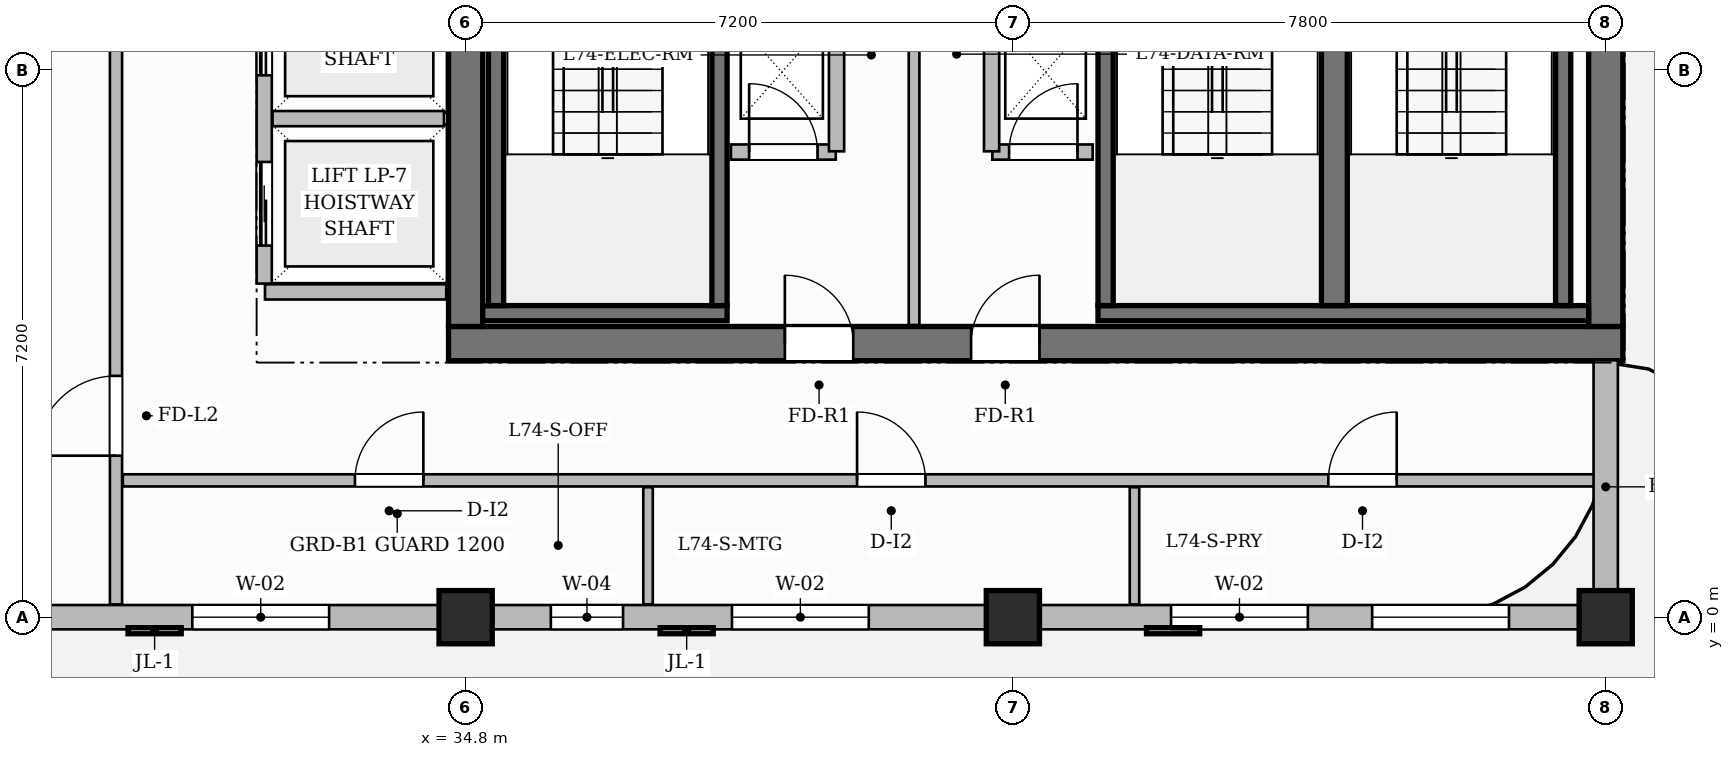
"""IFC4 building model, lengths in metres.
Left out: names, types, materials, properties, quantities, classifications, styles, units other than length and angle.
Written with IfcOpenShell. Run it as: python <this file> out.ifc"""

import sys

from ifc_helpers import new_model, si_unit, direction, frame, frame_2d, origin, origin_2d, place, context, subcontext, project, spatial, rectangle, extrude, source, transform, mapped, element, fill, save


model = new_model("IFC4")
c1 = context("Model", 3, precision=1e-05, world=origin(), true_north=direction((0.0, 1.0)))
c2 = subcontext(c1, "Body", "Model", "MODEL_VIEW")
j1 = project(units=[si_unit("LENGTHUNIT", "METRE"), si_unit("PLANEANGLEUNIT", "RADIAN")], contexts=[c1])
p1 = place(None, origin())
s1 = spatial("IfcSite", under=j1, at=p1, CompositionType="ELEMENT")
p2 = place(p1, origin())
s2 = spatial("IfcBuilding", under=s1, at=p2, CompositionType="ELEMENT")
p3 = place(p2, frame((0.0, 0.0, 294.3)))
s3 = spatial("IfcBuildingStorey", under=s2, at=p3, CompositionType="ELEMENT", Elevation=294.3)
p4 = place(p3, frame((34.575, 3.6, 0.0), z_axis=(0.0, 0.0, 1.0), x_axis=(1.0, 0.0, 0.0)))
e1 = element("IfcWall", 1, at=p4, inside=s3, PredefinedType="SHEAR", context=c2, shape_type="SweptSolid", body=[
    extrude(rectangle(XDim=15.45, YDim=0.45, at=frame_2d((7.725, 0.0))), origin(), (0.0, 0.0, 1.0), 4.8),
])
p5 = place(p4, frame((4.425, 0.0, 0.0)))
e2 = element("IfcOpeningElement", 2, at=p5, cuts=e1, PredefinedType="OPENING", context=c2, shape_type="SweptSolid", body=[
    extrude(rectangle(XDim=0.9, YDim=2.1, at=frame_2d((0.45, 1.05))), frame((0.0, 0.235, 0.0), z_axis=(0.0, -1.0, 0.0), x_axis=(1.0, 0.0, 0.0)), (0.0, 0.0, 1.0), 0.47),
])
p6 = place(p4, frame((6.875, 0.0, 0.0)))
e3 = element("IfcOpeningElement", 3, at=p6, cuts=e1, PredefinedType="OPENING", context=c2, shape_type="SweptSolid", body=[
    extrude(rectangle(XDim=0.9, YDim=2.1, at=frame_2d((0.45, 1.05))), frame((0.0, 0.235, 0.0), z_axis=(0.0, -1.0, 0.0), x_axis=(1.0, 0.0, 0.0)), (0.0, 0.0, 1.0), 0.47),
])
for number, where, z_axis, x_axis in (
    (4, (34.8, 3.825, 0.0), (0.0, 0.0, 1.0), (0.0, 1.0, 0.0)),
    (5, (49.8, 3.825, 0.0), (0.0, 0.0, 1.0), (0.0, 1.0, 0.0)),
):
    element("IfcWall", number, at=place(p3, frame(where, z_axis=z_axis, x_axis=x_axis)), inside=s3, PredefinedType="SHEAR", context=c2, shape_type="SweptSolid", body=[
        extrude(rectangle(XDim=10.35, YDim=0.45, at=frame_2d((5.175, 0.0))), origin(), (0.0, 0.0, 1.0), 4.8),
    ])
m1 = source(origin(), c2, "Body", "SweptSolid", [
    extrude(rectangle(XDim=0.7, YDim=0.7, at=origin_2d()), origin(), (0.0, 0.0, 1.0), 4.8),
])
for number, where, z_axis, x_axis in (
    (6, (34.8, 0.0, 0.0), (0.0, 0.0, 1.0), (1.0, 0.0, 0.0)),
    (7, (42.0, 0.0, 0.0), (0.0, 0.0, 1.0), (1.0, 0.0, 0.0)),
    (8, (49.8, 0.0, 0.0), (0.0, 0.0, 1.0), (1.0, 0.0, 0.0)),
):
    element("IfcColumn", number, at=place(p3, frame(where, z_axis=z_axis, x_axis=x_axis)), inside=s3, PredefinedType="COLUMN", context=c2, shape_type="MappedRepresentation", body=[
        mapped(m1, transform((0.0, 0.0, 0.0), scale=1.0)),
    ])
p7 = place(p3, frame((35.025, 4.0, 0.0), z_axis=(0.0, 0.0, 1.0), x_axis=(1.0, 0.0, 0.0)))
e9 = element("IfcWall", 9, at=p7, inside=s3, PredefinedType="SHEAR", context=c2, shape_type="SweptSolid", body=[
    extrude(rectangle(XDim=3.215, YDim=0.2, at=frame_2d((1.607, 0.0))), origin(), (0.0, 0.0, 1.0), 4.8),
])
for number, where, z_axis, x_axis in (
    (10, (35.2, 4.1, 0.0), (0.0, 0.0, 1.0), (0.0, 1.0, 0.0)),
    (11, (38.14, 4.1, 0.0), (0.0, 0.0, 1.0), (0.0, 1.0, 0.0)),
):
    element("IfcWall", number, at=place(p3, frame(where, z_axis=z_axis, x_axis=x_axis)), inside=s3, PredefinedType="SHEAR", context=c2, shape_type="SweptSolid", body=[
        extrude(rectangle(XDim=6.95, YDim=0.2, at=frame_2d((3.475, 0.0))), origin(), (0.0, 0.0, 1.0), 4.8),
    ])
p8 = place(p3, frame((43.12, 4.0, 0.0), z_axis=(0.0, 0.0, 1.0), x_axis=(1.0, 0.0, 0.0)))
e12 = element("IfcWall", 12, at=p8, inside=s3, PredefinedType="SHEAR", context=c2, shape_type="SweptSolid", body=[
    extrude(rectangle(XDim=6.455, YDim=0.2, at=frame_2d((3.228, 0.0))), origin(), (0.0, 0.0, 1.0), 4.8),
])
p9 = place(p3, frame((43.22, 4.1, 0.0), z_axis=(0.0, 0.0, 1.0), x_axis=(0.0, 1.0, 0.0)))
e13 = element("IfcWall", 13, at=p9, inside=s3, PredefinedType="SHEAR", context=c2, shape_type="SweptSolid", body=[
    extrude(rectangle(XDim=6.95, YDim=0.2, at=frame_2d((3.475, 0.0))), origin(), (0.0, 0.0, 1.0), 4.8),
])
p10 = place(p3, frame((46.23, 4.1, 0.0), z_axis=(0.0, 0.0, 1.0), x_axis=(0.0, 1.0, 0.0)))
e14 = element("IfcWall", 14, at=p10, inside=s3, PredefinedType="SHEAR", context=c2, shape_type="SweptSolid", body=[
    extrude(rectangle(XDim=6.95, YDim=0.34, at=frame_2d((3.475, 0.0))), origin(), (0.0, 0.0, 1.0), 4.8),
])
p11 = place(p3, frame((49.24, 4.1, 0.0), z_axis=(0.0, 0.0, 1.0), x_axis=(0.0, 1.0, 0.0)))
e15 = element("IfcWall", 15, at=p11, inside=s3, PredefinedType="SHEAR", context=c2, shape_type="SweptSolid", body=[
    extrude(rectangle(XDim=6.95, YDim=0.2, at=frame_2d((3.475, 0.0))), origin(), (0.0, 0.0, 1.0), 4.8),
])
p12 = place(p3, frame((38.29, 6.12, 0.0), z_axis=(0.0, 0.0, 1.0), x_axis=(1.0, 0.0, 0.0)))
e16 = element("IfcWall", 16, at=p12, inside=s3, PredefinedType="PARTITIONING", context=c2, shape_type="SweptSolid", body=[
    extrude(rectangle(XDim=1.38, YDim=0.2, at=frame_2d((0.69, 0.0))), origin(), (0.0, 0.0, 1.0), 4.5),
])
p13 = place(p12, frame((0.24, 0.0, 0.0)))
e17 = element("IfcOpeningElement", 17, at=p13, cuts=e16, PredefinedType="OPENING", context=c2, shape_type="SweptSolid", body=[
    extrude(rectangle(XDim=0.9, YDim=2.1, at=frame_2d((0.45, 1.05))), frame((0.0, 0.11, 0.0), z_axis=(0.0, -1.0, 0.0), x_axis=(1.0, 0.0, 0.0)), (0.0, 0.0, 1.0), 0.22),
])
p14 = place(p3, frame((39.68, 6.13, 0.0), z_axis=(0.0, 0.0, 1.0), x_axis=(0.0, 1.0, 0.0)))
e18 = element("IfcWall", 18, at=p14, inside=s3, PredefinedType="PARTITIONING", context=c2, shape_type="SweptSolid", body=[
    extrude(rectangle(XDim=1.79, YDim=0.2, at=frame_2d((0.895, 0.0))), origin(), (0.0, 0.0, 1.0), 4.5),
])
p15 = place(p3, frame((41.73, 6.12, 0.0), z_axis=(0.0, 0.0, 1.0), x_axis=(1.0, 0.0, 0.0)))
e19 = element("IfcWall", 19, at=p15, inside=s3, PredefinedType="PARTITIONING", context=c2, shape_type="SweptSolid", body=[
    extrude(rectangle(XDim=1.32, YDim=0.2, at=frame_2d((0.66, 0.0))), origin(), (0.0, 0.0, 1.0), 4.5),
])
p16 = place(p15, frame((0.22, 0.0, 0.0)))
e20 = element("IfcOpeningElement", 20, at=p16, cuts=e19, PredefinedType="OPENING", context=c2, shape_type="SweptSolid", body=[
    extrude(rectangle(XDim=0.9, YDim=2.1, at=frame_2d((0.45, 1.05))), frame((0.0, 0.11, 0.0), z_axis=(0.0, -1.0, 0.0), x_axis=(1.0, 0.0, 0.0)), (0.0, 0.0, 1.0), 0.22),
])
p17 = place(p3, frame((41.72, 6.13, 0.0), z_axis=(0.0, 0.0, 1.0), x_axis=(0.0, 1.0, 0.0)))
e21 = element("IfcWall", 21, at=p17, inside=s3, PredefinedType="PARTITIONING", context=c2, shape_type="SweptSolid", body=[
    extrude(rectangle(XDim=1.79, YDim=0.2, at=frame_2d((0.895, 0.0))), origin(), (0.0, 0.0, 1.0), 4.5),
])
p18 = place(p3, frame((40.7, 3.845, 0.0), z_axis=(0.0, 0.0, 1.0), x_axis=(0.0, 1.0, 0.0)))
e22 = element("IfcWall", 22, at=p18, inside=s3, PredefinedType="PARTITIONING", context=c2, shape_type="SweptSolid", body=[
    extrude(rectangle(XDim=4.065, YDim=0.14, at=frame_2d((2.032, 0.0))), origin(), (0.0, 0.0, 1.0), 4.5),
])
p19 = place(p3, frame((32.16, 4.28, 0.0), z_axis=(0.0, 0.0, 1.0), x_axis=(1.0, 0.0, 0.0)))
e23 = element("IfcWall", 23, at=p19, inside=s3, PredefinedType="PARTITIONING", context=c2, shape_type="SweptSolid", body=[
    extrude(rectangle(XDim=2.385, YDim=0.2, at=frame_2d((1.192, 0.0))), origin(), (0.0, 0.0, 1.0), 4.5),
])
p20 = place(p3, frame((32.15, 4.39, 0.0), z_axis=(0.0, 0.0, 1.0), x_axis=(0.0, 1.0, 0.0)))
e24 = element("IfcWall", 24, at=p20, inside=s3, PredefinedType="PARTITIONING", context=c2, shape_type="SweptSolid", body=[
    extrude(rectangle(XDim=8.82, YDim=0.2, at=frame_2d((4.41, 0.0))), origin(), (0.0, 0.0, 1.0), 4.5),
])
p21 = place(p20, frame((0.5, 0.0, 0.0)))
e25 = element("IfcOpeningElement", 25, at=p21, cuts=e24, PredefinedType="OPENING", context=c2, shape_type="SweptSolid", body=[
    extrude(rectangle(XDim=1.1, YDim=2.2, at=frame_2d((0.55, 1.1))), frame((0.0, 0.11, 0.0), z_axis=(0.0, -1.0, 0.0), x_axis=(1.0, 0.0, 0.0)), (0.0, 0.0, 1.0), 0.22),
])
p22 = place(p20, frame((2.74, 0.0, 0.0)))
e26 = element("IfcOpeningElement", 26, at=p22, cuts=e24, PredefinedType="OPENING", context=c2, shape_type="SweptSolid", body=[
    extrude(rectangle(XDim=1.1, YDim=2.2, at=frame_2d((0.55, 1.1))), frame((0.0, 0.11, 0.0), z_axis=(0.0, -1.0, 0.0), x_axis=(1.0, 0.0, 0.0)), (0.0, 0.0, 1.0), 0.22),
])
p23 = place(p20, frame((4.98, 0.0, 0.0)))
e27 = element("IfcOpeningElement", 27, at=p23, cuts=e24, PredefinedType="OPENING", context=c2, shape_type="SweptSolid", body=[
    extrude(rectangle(XDim=1.1, YDim=2.2, at=frame_2d((0.55, 1.1))), frame((0.0, 0.11, 0.0), z_axis=(0.0, -1.0, 0.0), x_axis=(1.0, 0.0, 0.0)), (0.0, 0.0, 1.0), 0.22),
])
p24 = place(p20, frame((7.22, 0.0, 0.0)))
e28 = element("IfcOpeningElement", 28, at=p24, cuts=e24, PredefinedType="OPENING", context=c2, shape_type="SweptSolid", body=[
    extrude(rectangle(XDim=1.1, YDim=2.2, at=frame_2d((0.55, 1.1))), frame((0.0, 0.11, 0.0), z_axis=(0.0, -1.0, 0.0), x_axis=(1.0, 0.0, 0.0)), (0.0, 0.0, 1.0), 0.22),
])
p25 = place(p3, frame((32.26, 6.56, 0.0), z_axis=(0.0, 0.0, 1.0), x_axis=(1.0, 0.0, 0.0)))
e29 = element("IfcWall", 29, at=p25, inside=s3, PredefinedType="PARTITIONING", context=c2, shape_type="SweptSolid", body=[
    extrude(rectangle(XDim=2.255, YDim=0.2, at=frame_2d((1.127, 0.0))), origin(), (0.0, 0.0, 1.0), 4.5),
])
p26 = place(p3, frame((30.2, 0.168, 0.0), z_axis=(0.0, 0.0, 1.0), x_axis=(0.0, 1.0, 0.0)))
e30 = element("IfcWall", 30, at=p26, inside=s3, PredefinedType="PARTITIONING", context=c2, shape_type="SweptSolid", body=[
    extrude(rectangle(XDim=9.492, YDim=0.16, at=frame_2d((4.746, 0.0))), origin(), (0.0, 0.0, 1.0), 4.5),
])
p27 = place(p26, frame((1.957, 0.0, 0.0)))
e31 = element("IfcOpeningElement", 31, at=p27, cuts=e30, PredefinedType="OPENING", context=c2, shape_type="SweptSolid", body=[
    extrude(rectangle(XDim=1.05, YDim=2.15, at=frame_2d((0.525, 1.075))), frame((0.0, 0.09, 0.0), z_axis=(0.0, -1.0, 0.0), x_axis=(1.0, 0.0, 0.0)), (0.0, 0.0, 1.0), 0.18),
])
p28 = place(p3, frame((30.29, 1.8, 0.0), z_axis=(0.0, 0.0, 1.0), x_axis=(1.0, 0.0, 0.0)))
e32 = element("IfcWall", 32, at=p28, inside=s3, PredefinedType="PARTITIONING", context=c2, shape_type="SweptSolid", body=[
    extrude(rectangle(XDim=19.37, YDim=0.16, at=frame_2d((9.685, 0.0))), origin(), (0.0, 0.0, 1.0), 4.5),
])
p29 = place(p28, frame((3.054, 0.0, 0.0)))
e33 = element("IfcOpeningElement", 33, at=p29, cuts=e32, PredefinedType="OPENING", context=c2, shape_type="SweptSolid", body=[
    extrude(rectangle(XDim=0.9, YDim=2.15, at=frame_2d((0.45, 1.075))), frame((0.0, 0.09, 0.0), z_axis=(0.0, -1.0, 0.0), x_axis=(1.0, 0.0, 0.0)), (0.0, 0.0, 1.0), 0.18),
])
p30 = place(p28, frame((9.66, 0.0, 0.0)))
e34 = element("IfcOpeningElement", 34, at=p30, cuts=e32, PredefinedType="OPENING", context=c2, shape_type="SweptSolid", body=[
    extrude(rectangle(XDim=0.9, YDim=2.15, at=frame_2d((0.45, 1.075))), frame((0.0, 0.09, 0.0), z_axis=(0.0, -1.0, 0.0), x_axis=(1.0, 0.0, 0.0)), (0.0, 0.0, 1.0), 0.18),
])
p31 = place(p28, frame((15.86, 0.0, 0.0)))
e35 = element("IfcOpeningElement", 35, at=p31, cuts=e32, PredefinedType="OPENING", context=c2, shape_type="SweptSolid", body=[
    extrude(rectangle(XDim=0.9, YDim=2.15, at=frame_2d((0.45, 1.075))), frame((0.0, 0.09, 0.0), z_axis=(0.0, -1.0, 0.0), x_axis=(1.0, 0.0, 0.0)), (0.0, 0.0, 1.0), 0.18),
])
for number, where, z_axis, x_axis in (
    (36, (37.2, 0.168, 0.0), (0.0, 0.0, 1.0), (0.0, 1.0, 0.0)),
    (37, (43.6, 0.168, 0.0), (0.0, 0.0, 1.0), (0.0, 1.0, 0.0)),
):
    element("IfcWall", number, at=place(p3, frame(where, z_axis=z_axis, x_axis=x_axis)), inside=s3, PredefinedType="PARTITIONING", context=c2, shape_type="SweptSolid", body=[
        extrude(rectangle(XDim=1.542, YDim=0.125, at=frame_2d((0.771, 0.0))), origin(), (0.0, 0.0, 1.0), 4.5),
    ])
p32 = place(p3, frame((18.0, 0.0, 0.0), z_axis=(0.0, 0.0, 1.0), x_axis=(1.0, 0.0, 0.0)))
e38 = element("IfcWall", 38, at=p32, inside=s3, PredefinedType="SOLIDWALL", context=c2, shape_type="SweptSolid", body=[
    extrude(rectangle(XDim=31.8, YDim=0.32, at=frame_2d((15.9, 0.0))), origin(), (0.0, 0.0, 1.0), 3.785),
])
p33 = place(p32, frame((0.42, 0.0, 0.0)))
e39 = element("IfcOpeningElement", 39, at=p33, cuts=e38, PredefinedType="OPENING", context=c2, shape_type="SweptSolid", body=[
    extrude(rectangle(XDim=1.2, YDim=2.2, at=frame_2d((0.6, 1.1))), frame((0.0, 0.17, 0.0), z_axis=(0.0, -1.0, 0.0), x_axis=(1.0, 0.0, 0.0)), (0.0, 0.0, 1.0), 0.34),
])
p34 = place(p32, frame((4.649, 0.0, 0.8)))
e40 = element("IfcOpeningElement", 40, at=p34, cuts=e38, PredefinedType="OPENING", context=c2, shape_type="SweptSolid", body=[
    extrude(rectangle(XDim=0.95, YDim=1.75, at=frame_2d((0.475, 0.875))), frame((0.0, 0.17, 0.0), z_axis=(0.0, -1.0, 0.0), x_axis=(1.0, 0.0, 0.0)), (0.0, 0.0, 1.0), 0.34),
])
p35 = place(p32, frame((7.032, 0.0, 0.8)))
e41 = element("IfcOpeningElement", 41, at=p35, cuts=e38, PredefinedType="OPENING", context=c2, shape_type="SweptSolid", body=[
    extrude(rectangle(XDim=1.8, YDim=1.85, at=frame_2d((0.9, 0.925))), frame((0.0, 0.17, 0.0), z_axis=(0.0, -1.0, 0.0), x_axis=(1.0, 0.0, 0.0)), (0.0, 0.0, 1.0), 0.34),
])
p36 = place(p32, frame((13.204, 0.0, 0.8)))
e42 = element("IfcOpeningElement", 42, at=p36, cuts=e38, PredefinedType="OPENING", context=c2, shape_type="SweptSolid", body=[
    extrude(rectangle(XDim=1.8, YDim=1.85, at=frame_2d((0.9, 0.925))), frame((0.0, 0.17, 0.0), z_axis=(0.0, -1.0, 0.0), x_axis=(1.0, 0.0, 0.0)), (0.0, 0.0, 1.0), 0.34),
])
p37 = place(p32, frame((17.921, 0.0, 0.8)))
e43 = element("IfcOpeningElement", 43, at=p37, cuts=e38, PredefinedType="OPENING", context=c2, shape_type="SweptSolid", body=[
    extrude(rectangle(XDim=0.95, YDim=1.75, at=frame_2d((0.475, 0.875))), frame((0.0, 0.17, 0.0), z_axis=(0.0, -1.0, 0.0), x_axis=(1.0, 0.0, 0.0)), (0.0, 0.0, 1.0), 0.34),
])
p38 = place(p32, frame((20.304, 0.0, 0.8)))
e44 = element("IfcOpeningElement", 44, at=p38, cuts=e38, PredefinedType="OPENING", context=c2, shape_type="SweptSolid", body=[
    extrude(rectangle(XDim=1.8, YDim=1.85, at=frame_2d((0.9, 0.925))), frame((0.0, 0.17, 0.0), z_axis=(0.0, -1.0, 0.0), x_axis=(1.0, 0.0, 0.0)), (0.0, 0.0, 1.0), 0.34),
])
p39 = place(p32, frame((26.081, 0.0, 0.8)))
e45 = element("IfcOpeningElement", 45, at=p39, cuts=e38, PredefinedType="OPENING", context=c2, shape_type="SweptSolid", body=[
    extrude(rectangle(XDim=1.8, YDim=1.85, at=frame_2d((0.9, 0.925))), frame((0.0, 0.17, 0.0), z_axis=(0.0, -1.0, 0.0), x_axis=(1.0, 0.0, 0.0)), (0.0, 0.0, 1.0), 0.34),
])
p40 = place(p32, frame((28.727, 0.0, 0.8)))
e46 = element("IfcOpeningElement", 46, at=p40, cuts=e38, PredefinedType="OPENING", context=c2, shape_type="SweptSolid", body=[
    extrude(rectangle(XDim=1.8, YDim=1.85, at=frame_2d((0.9, 0.925))), frame((0.0, 0.17, 0.0), z_axis=(0.0, -1.0, 0.0), x_axis=(1.0, 0.0, 0.0)), (0.0, 0.0, 1.0), 0.34),
])
p41 = place(p3, frame((49.8, 0.05, 0.0), z_axis=(0.0, 0.0, 1.0), x_axis=(0.0, 1.0, 0.0)))
e47 = element("IfcWall", 47, at=p41, inside=s3, PredefinedType="SOLIDWALL", context=c2, shape_type="SweptSolid", body=[
    extrude(rectangle(XDim=3.33, YDim=0.32, at=frame_2d((1.665, 0.0))), origin(), (0.0, 0.0, 1.0), 4.5),
])
m2 = source(origin(), c2, "Body", "SweptSolid", [
    extrude(rectangle(XDim=0.9, YDim=2.1, at=frame_2d((0.45, 1.05))), frame((0.0, 0.025, 0.0), z_axis=(0.0, -1.0, 0.0), x_axis=(1.0, 0.0, 0.0)), (0.0, 0.0, 1.0), 0.05),
])
p42 = place(p13, origin())
e48 = element("IfcDoor", 48, at=p42, inside=s3, OperationType="SINGLE_SWING_LEFT", PredefinedType="DOOR", context=c2, shape_type="MappedRepresentation", body=[
    mapped(m2, transform((0.0, 0.0, 0.0), scale=1.0)),
])
fill(e17, e48)
p43 = place(p16, origin())
e49 = element("IfcDoor", 49, at=p43, inside=s3, OperationType="SINGLE_SWING_RIGHT", PredefinedType="DOOR", context=c2, shape_type="MappedRepresentation", body=[
    mapped(m2, transform((0.0, 0.0, 0.0), scale=1.0)),
])
fill(e20, e49)
p44 = place(p5, origin())
e50 = element("IfcDoor", 50, at=p44, inside=s3, OperationType="SINGLE_SWING_LEFT", PredefinedType="DOOR", context=c2, shape_type="MappedRepresentation", body=[
    mapped(m2, transform((0.0, 0.0, 0.0), scale=1.0)),
])
fill(e2, e50)
p45 = place(p6, origin())
e51 = element("IfcDoor", 51, at=p45, inside=s3, OperationType="SINGLE_SWING_RIGHT", PredefinedType="DOOR", context=c2, shape_type="MappedRepresentation", body=[
    mapped(m2, transform((0.0, 0.0, 0.0), scale=1.0)),
])
fill(e3, e51)
m3 = source(origin(), c2, "Body", "SweptSolid", [
    extrude(rectangle(XDim=1.05, YDim=2.15, at=frame_2d((0.525, 1.075))), frame((0.0, 0.025, 0.0), z_axis=(0.0, -1.0, 0.0), x_axis=(1.0, 0.0, 0.0)), (0.0, 0.0, 1.0), 0.05),
])
p46 = place(p27, origin())
e52 = element("IfcDoor", 52, at=p46, inside=s3, OperationType="SINGLE_SWING_LEFT", PredefinedType="DOOR", context=c2, shape_type="MappedRepresentation", body=[
    mapped(m3, transform((0.0, 0.0, 0.0), scale=1.0)),
])
fill(e31, e52)
m4 = source(origin(), c2, "Body", "SweptSolid", [
    extrude(rectangle(XDim=0.9, YDim=2.15, at=frame_2d((0.45, 1.075))), frame((0.0, 0.025, 0.0), z_axis=(0.0, -1.0, 0.0), x_axis=(1.0, 0.0, 0.0)), (0.0, 0.0, 1.0), 0.05),
])
p47 = place(p29, origin())
e53 = element("IfcDoor", 53, at=p47, inside=s3, OperationType="SINGLE_SWING_RIGHT", PredefinedType="DOOR", context=c2, shape_type="MappedRepresentation", body=[
    mapped(m4, transform((0.0, 0.0, 0.0), scale=1.0)),
])
fill(e33, e53)
p48 = place(p30, origin())
e54 = element("IfcDoor", 54, at=p48, inside=s3, OperationType="SINGLE_SWING_LEFT", PredefinedType="DOOR", context=c2, shape_type="MappedRepresentation", body=[
    mapped(m4, transform((0.0, 0.0, 0.0), scale=1.0)),
])
fill(e34, e54)
p49 = place(p31, origin())
e55 = element("IfcDoor", 55, at=p49, inside=s3, OperationType="SINGLE_SWING_RIGHT", PredefinedType="DOOR", context=c2, shape_type="MappedRepresentation", body=[
    mapped(m4, transform((0.0, 0.0, 0.0), scale=1.0)),
])
fill(e35, e55)
m5 = source(origin(), c2, "Body", "SweptSolid", [
    extrude(rectangle(XDim=1.1, YDim=2.2, at=frame_2d((0.55, 1.1))), frame((0.0, 0.025, 0.0), z_axis=(0.0, -1.0, 0.0), x_axis=(1.0, 0.0, 0.0)), (0.0, 0.0, 1.0), 0.05),
])
p50 = place(p21, origin())
e56 = element("IfcDoor", 56, at=p50, inside=s3, OperationType="SLIDING_TO_LEFT", PredefinedType="DOOR", context=c2, shape_type="MappedRepresentation", body=[
    mapped(m5, transform((0.0, 0.0, 0.0), scale=1.0)),
])
fill(e25, e56)
p51 = place(p22, origin())
e57 = element("IfcDoor", 57, at=p51, inside=s3, OperationType="SLIDING_TO_LEFT", PredefinedType="DOOR", context=c2, shape_type="MappedRepresentation", body=[
    mapped(m5, transform((0.0, 0.0, 0.0), scale=1.0)),
])
fill(e26, e57)
m6 = source(origin(), c2, "Body", "SweptSolid", [
    extrude(rectangle(XDim=1.8, YDim=1.85, at=frame_2d((0.9, 0.925))), frame((0.0, 0.03, 0.0), z_axis=(0.0, -1.0, 0.0), x_axis=(1.0, 0.0, 0.0)), (0.0, 0.0, 1.0), 0.06),
])
p52 = place(p36, origin())
e58 = element("IfcWindow", 58, at=p52, inside=s3, PartitioningType="DOUBLE_PANEL_VERTICAL", PredefinedType="WINDOW", context=c2, shape_type="MappedRepresentation", body=[
    mapped(m6, transform((0.0, 0.0, 0.0), scale=1.0)),
])
fill(e42, e58)
m7 = source(origin(), c2, "Body", "SweptSolid", [
    extrude(rectangle(XDim=0.95, YDim=1.75, at=frame_2d((0.475, 0.875))), frame((0.0, 0.03, 0.0), z_axis=(0.0, -1.0, 0.0), x_axis=(1.0, 0.0, 0.0)), (0.0, 0.0, 1.0), 0.06),
])
p53 = place(p37, origin())
e59 = element("IfcWindow", 59, at=p53, inside=s3, PartitioningType="SINGLE_PANEL", PredefinedType="WINDOW", context=c2, shape_type="MappedRepresentation", body=[
    mapped(m7, transform((0.0, 0.0, 0.0), scale=1.0)),
])
fill(e43, e59)
p54 = place(p38, origin())
e60 = element("IfcWindow", 60, at=p54, inside=s3, PartitioningType="DOUBLE_PANEL_VERTICAL", PredefinedType="WINDOW", context=c2, shape_type="MappedRepresentation", body=[
    mapped(m6, transform((0.0, 0.0, 0.0), scale=1.0)),
])
fill(e44, e60)
p55 = place(p39, origin())
e61 = element("IfcWindow", 61, at=p55, inside=s3, PartitioningType="DOUBLE_PANEL_VERTICAL", PredefinedType="WINDOW", context=c2, shape_type="MappedRepresentation", body=[
    mapped(m6, transform((0.0, 0.0, 0.0), scale=1.0)),
])
fill(e45, e61)
p56 = place(p40, origin())
e62 = element("IfcWindow", 62, at=p56, inside=s3, PartitioningType="DOUBLE_PANEL_VERTICAL", PredefinedType="WINDOW", context=c2, shape_type="MappedRepresentation", body=[
    mapped(m6, transform((0.0, 0.0, 0.0), scale=1.0)),
])
fill(e46, e62)
save(model, sys.argv[1])
